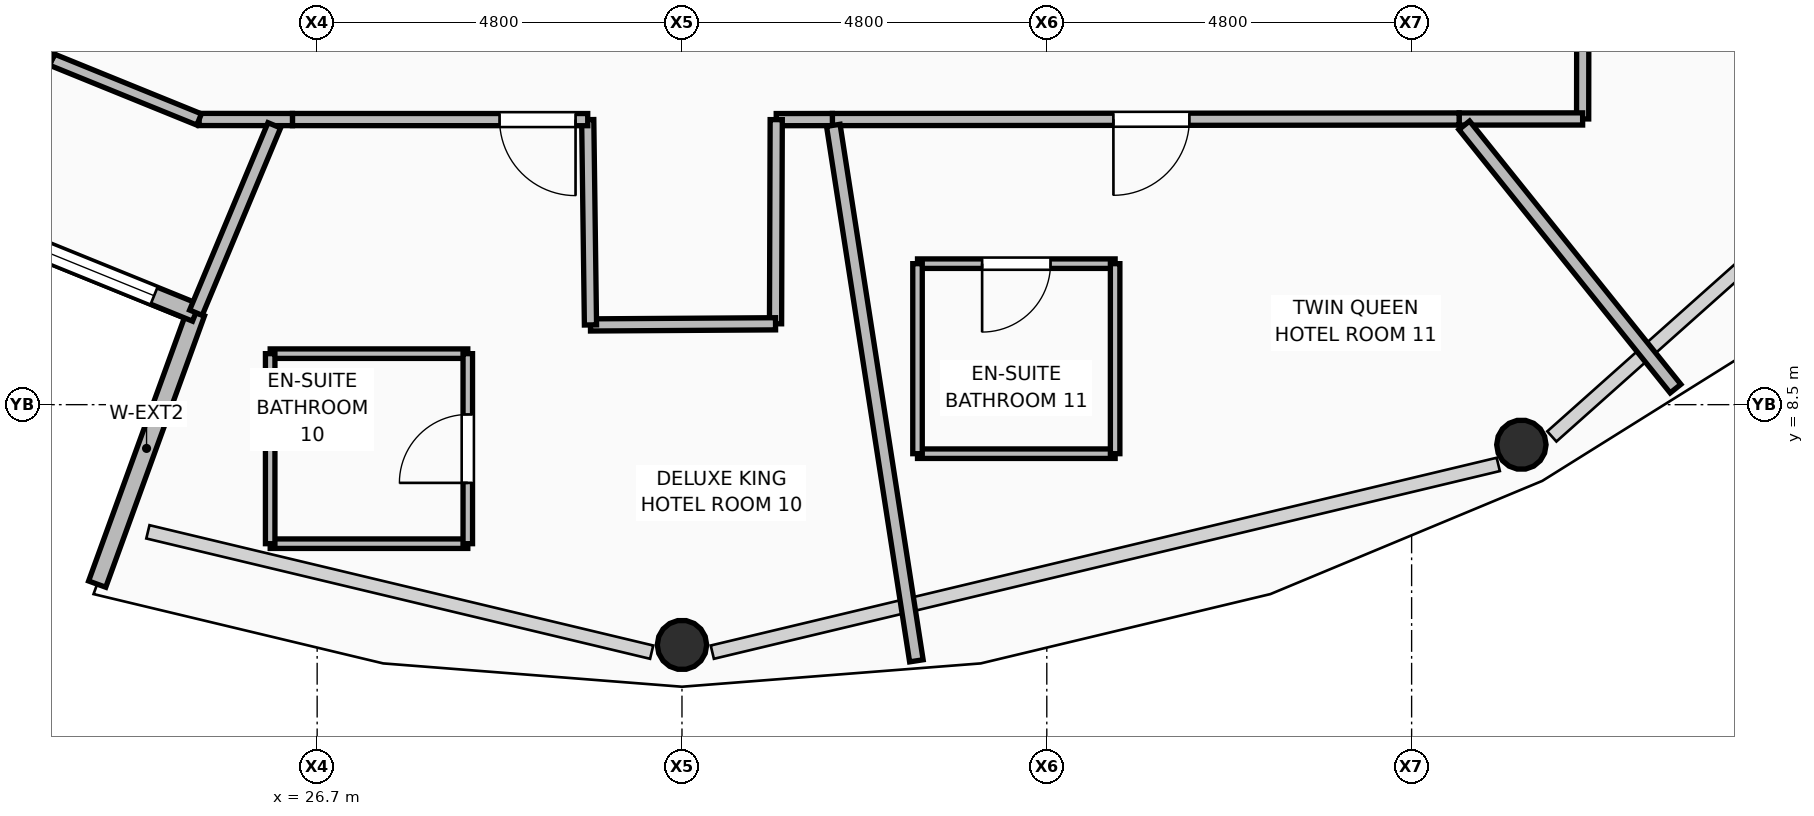
"""IFC4 building model, lengths in metres.
Left out: names, types, materials, properties, quantities, classifications, styles, units other than length and angle.
Written with IfcOpenShell. Run it as: python <this file> out.ifc"""

import sys

from ifc_helpers import new_model, si_unit, direction, frame, frame_2d, origin, origin_2d, place, context, subcontext, project, spatial, rectangle, hollow_circle, extrude, element, fill, save


model = new_model("IFC4")
c1 = context("Model", 3, precision=1e-05, world=origin(), true_north=direction((0.0, 1.0)))
c2 = subcontext(c1, "Body", "Model", "MODEL_VIEW")
j1 = project(units=[si_unit("LENGTHUNIT", "METRE"), si_unit("PLANEANGLEUNIT", "RADIAN")], contexts=[c1])
p1 = place(None, origin())
s1 = spatial("IfcSite", under=j1, at=p1, CompositionType="ELEMENT")
p2 = place(p1, origin())
s2 = spatial("IfcBuilding", under=s1, at=p2, CompositionType="ELEMENT")
p3 = place(p2, frame((0.0, 0.0, 216.15)))
s3 = spatial("IfcBuildingStorey", under=s2, at=p3, CompositionType="ELEMENT", Elevation=216.15)
p4 = place(p3, frame((31.5, 5.339, 0.0), z_axis=(0.0, 0.01818751295, 0.999834593507), x_axis=(-1.0, 0.0, 0.0)))
e1 = element("IfcColumn", 1, at=p4, inside=s3, PredefinedType="COLUMN", context=c2, shape_type="SweptSolid", body=[
    extrude(hollow_circle(Radius=0.325, WallThickness=0.03, at=origin_2d()), origin(), (0.0, 0.0, 1.0), 3.571),
])
p5 = place(p3, frame((42.544, 7.973, 0.0), z_axis=(-0.010597834049, 0.015725818266, 0.999820176108), x_axis=(-0.829266427591, -0.558853462072, 0.0)))
e2 = element("IfcColumn", 2, at=p5, inside=s3, PredefinedType="COLUMN", context=c2, shape_type="SweptSolid", body=[
    extrude(hollow_circle(Radius=0.325, WallThickness=0.03, at=origin_2d()), origin(), (0.0, 0.0, 1.0), 3.571),
])
p6 = place(p3, frame((25.105, 9.71, 0.0), z_axis=(0.0, 0.0, 1.0), x_axis=(-0.34186170747, -0.939750271596, 0.0)))
e3 = element("IfcWall", 3, at=p6, inside=s3, PredefinedType="SOLIDWALL", context=c2, shape_type="SweptSolid", body=[
    extrude(rectangle(XDim=3.8, YDim=0.24, at=frame_2d((1.9, 0.0))), origin(), (0.0, 0.0, 1.0), 3.57),
])
p7 = place(p3, frame((22.151, 10.909, 0.0), z_axis=(0.0, 0.0, 1.0), x_axis=(0.926590027223, -0.376073026752, 0.0)))
e4 = element("IfcWall", 4, at=p7, inside=s3, PredefinedType="SOLIDWALL", context=c2, shape_type="SweptSolid", body=[
    extrude(rectangle(XDim=3.188, YDim=0.24, at=frame_2d((1.594, 0.0))), origin(), (0.0, 0.0, 1.0), 3.57),
])
p8 = place(p7, frame((0.594, 0.0, 0.85)))
e5 = element("IfcOpeningElement", 5, at=p8, cuts=e4, PredefinedType="OPENING", context=c2, shape_type="SweptSolid", body=[
    extrude(rectangle(XDim=2.0, YDim=2.4, at=frame_2d((1.0, 1.2))), frame((0.0, 0.13, 0.0), z_axis=(0.0, -1.0, 0.0), x_axis=(1.0, 0.0, 0.0)), (0.0, 0.0, 1.0), 0.26),
])
p9 = place(p3, frame((43.36, 19.529, 0.0), z_axis=(0.0, 0.0, 1.0), x_axis=(-0.001376854092, -0.999999052136, 0.0)))
e6 = element("IfcWall", 6, at=p9, inside=s3, PredefinedType="PARTITIONING", context=c2, shape_type="SweptSolid", body=[
    extrude(rectangle(XDim=7.27, YDim=0.16, at=frame_2d((3.635, 0.0))), origin(), (0.0, 0.0, 1.0), 3.081),
])
p10 = place(p9, frame((0.602, 0.0, 0.0)))
e7 = element("IfcOpeningElement", 7, at=p10, cuts=e6, PredefinedType="OPENING", context=c2, shape_type="SweptSolid", body=[
    extrude(rectangle(XDim=1.2, YDim=2.1, at=frame_2d((0.6, 1.05))), frame((0.0, 0.09, 0.0), z_axis=(0.0, -1.0, 0.0), x_axis=(1.0, 0.0, 0.0)), (0.0, 0.0, 1.0), 0.18),
])
p11 = place(p3, frame((43.35, 12.259, 0.0), z_axis=(0.0, 0.0, 1.0), x_axis=(-0.999999819423, -0.00060096143, 0.0)))
e8 = element("IfcWall", 8, at=p11, inside=s3, PredefinedType="PARTITIONING", context=c2, shape_type="SweptSolid", body=[
    extrude(rectangle(XDim=1.625, YDim=0.16, at=frame_2d((0.812, 0.0))), origin(), (0.0, 0.0, 1.0), 3.081),
])
p12 = place(p3, frame((41.725, 12.258, 0.0), z_axis=(0.0, 0.0, 1.0), x_axis=(-0.999999631405, -0.000858597504, 0.0)))
e9 = element("IfcWall", 9, at=p12, inside=s3, PredefinedType="PARTITIONING", context=c2, shape_type="SweptSolid", body=[
    extrude(rectangle(XDim=8.246, YDim=0.16, at=frame_2d((4.123, 0.0))), origin(), (0.0, 0.0, 1.0), 3.081),
])
p13 = place(p12, frame((3.549, 0.0, 0.0)))
e10 = element("IfcOpeningElement", 10, at=p13, cuts=e9, PredefinedType="OPENING", context=c2, shape_type="SweptSolid", body=[
    extrude(rectangle(XDim=1.0, YDim=2.1, at=frame_2d((0.5, 1.05))), frame((0.0, 0.09, 0.0), z_axis=(0.0, -1.0, 0.0), x_axis=(1.0, 0.0, 0.0)), (0.0, 0.0, 1.0), 0.18),
])
p14 = place(p3, frame((33.479, 12.251, 0.0), z_axis=(0.0, 0.0, 1.0), x_axis=(-0.999999126899, -0.001321439216, 0.0)))
e11 = element("IfcWall", 11, at=p14, inside=s3, PredefinedType="PARTITIONING", context=c2, shape_type="SweptSolid", body=[
    extrude(rectangle(XDim=0.739, YDim=0.16, at=frame_2d((0.37, 0.0))), origin(), (0.0, 0.0, 1.0), 3.55),
])
p15 = place(p3, frame((32.74, 12.25, 0.0), z_axis=(0.0, 0.0, 1.0), x_axis=(-0.003363005887, -0.99999434508, 0.0)))
e12 = element("IfcWall", 12, at=p15, inside=s3, PredefinedType="PARTITIONING", context=c2, shape_type="SweptSolid", body=[
    extrude(rectangle(XDim=2.686, YDim=0.16, at=frame_2d((1.343, 0.0))), origin(), (0.0, 0.0, 1.0), 3.55),
])
p16 = place(p3, frame((32.731, 9.564, 0.0), z_axis=(0.0, 0.0, 1.0), x_axis=(-0.9999812984, -0.006115786966, 0.0)))
e13 = element("IfcWall", 13, at=p16, inside=s3, PredefinedType="PARTITIONING", context=c2, shape_type="SweptSolid", body=[
    extrude(rectangle(XDim=2.435, YDim=0.16, at=frame_2d((1.218, 0.0))), origin(), (0.0, 0.0, 1.0), 3.081),
])
p17 = place(p3, frame((30.296, 9.549, 0.0), z_axis=(0.0, 0.0, 1.0), x_axis=(-0.013286362168, 0.999911732395, 0.0)))
e14 = element("IfcWall", 14, at=p17, inside=s3, PredefinedType="PARTITIONING", context=c2, shape_type="SweptSolid", body=[
    extrude(rectangle(XDim=2.701, YDim=0.16, at=frame_2d((1.351, 0.0))), origin(), (0.0, 0.0, 1.0), 3.55),
])
p18 = place(p3, frame((30.26, 12.25, 0.0), z_axis=(0.0, 0.0, 1.0), x_axis=(-0.999999968407, 0.000251366799, 0.0)))
e15 = element("IfcWall", 15, at=p18, inside=s3, PredefinedType="PARTITIONING", context=c2, shape_type="SweptSolid", body=[
    extrude(rectangle(XDim=3.885, YDim=0.16, at=frame_2d((1.942, 0.0))), origin(), (0.0, 0.0, 1.0), 3.55),
])
p19 = place(p18, frame((0.16, 0.0, 0.0)))
e16 = element("IfcOpeningElement", 16, at=p19, cuts=e15, PredefinedType="OPENING", context=c2, shape_type="SweptSolid", body=[
    extrude(rectangle(XDim=1.0, YDim=2.1, at=frame_2d((0.5, 1.05))), frame((0.0, 0.09, 0.0), z_axis=(0.0, -1.0, 0.0), x_axis=(1.0, 0.0, 0.0)), (0.0, 0.0, 1.0), 0.18),
])
p20 = place(p3, frame((26.375, 12.251, 0.0), z_axis=(0.0, 0.0, 1.0), x_axis=(-0.999999683806, 0.000795228377, 0.0)))
e17 = element("IfcWall", 17, at=p20, inside=s3, PredefinedType="PARTITIONING", context=c2, shape_type="SweptSolid", body=[
    extrude(rectangle(XDim=1.228, YDim=0.16, at=frame_2d((0.614, 0.0))), origin(), (0.0, 0.0, 1.0), 3.55),
])
p21 = place(p3, frame((25.147, 12.252, 0.0), z_axis=(0.0, 0.0, 1.0), x_axis=(-0.926367254425, 0.376621441143, 0.0)))
e18 = element("IfcWall", 18, at=p21, inside=s3, PredefinedType="PARTITIONING", context=c2, shape_type="SweptSolid", body=[
    extrude(rectangle(XDim=2.09, YDim=0.16, at=frame_2d((1.045, 0.0))), origin(), (0.0, 0.0, 1.0), 3.55),
])
p22 = place(p3, frame((23.211, 13.039, 0.0), z_axis=(0.0, 0.0, 1.0), x_axis=(-0.853752527211, 0.520679001191, 0.0)))
e19 = element("IfcWall", 19, at=p22, inside=s3, PredefinedType="PARTITIONING", context=c2, shape_type="SweptSolid", body=[
    extrude(rectangle(XDim=2.729, YDim=0.16, at=frame_2d((1.365, 0.0))), origin(), (0.0, 0.0, 1.0), 3.081),
])
p23 = place(p3, frame((26.136, 12.175, 0.0), z_axis=(0.0, 0.0, 1.0), x_axis=(-0.385854205699, -0.922559771475, 0.0)))
e20 = element("IfcWall", 20, at=p23, inside=s3, PredefinedType="PARTITIONING", context=c2, shape_type="SweptSolid", body=[
    extrude(rectangle(XDim=2.672, YDim=0.18, at=frame_2d((1.336, 0.0))), origin(), (0.0, 0.0, 1.0), 3.55),
])
p24 = place(p3, frame((33.491, 12.175, 0.0), z_axis=(0.0, 0.0, 1.0), x_axis=(0.153310232807, -0.988178107689, 0.0)))
e21 = element("IfcWall", 21, at=p24, inside=s3, PredefinedType="PARTITIONING", context=c2, shape_type="SweptSolid", body=[
    extrude(rectangle(XDim=7.129, YDim=0.18, at=frame_2d((3.565, 0.0))), origin(), (0.0, 0.0, 1.0), 2.925),
])
p25 = place(p3, frame((41.792, 12.175, 0.0), z_axis=(0.0, 0.0, 1.0), x_axis=(0.625894170608, -0.779907999189, 0.0)))
e22 = element("IfcWall", 22, at=p25, inside=s3, PredefinedType="PARTITIONING", context=c2, shape_type="SweptSolid", body=[
    extrude(rectangle(XDim=4.442, YDim=0.18, at=frame_2d((2.221, 0.0))), origin(), (0.0, 0.0, 1.0), 2.925),
])
p26 = place(p3, frame((26.082, 6.671, 0.0), z_axis=(0.0, 0.0, 1.0), x_axis=(1.0, 0.0, 0.0)))
e23 = element("IfcWall", 23, at=p26, inside=s3, PredefinedType="PARTITIONING", context=c2, shape_type="SweptSolid", body=[
    extrude(rectangle(XDim=2.6, YDim=0.125, at=frame_2d((1.3, 0.0))), origin(), (0.0, 0.0, 1.0), 2.925),
])
p27 = place(p3, frame((26.082, 9.171, 0.0), z_axis=(0.0, 0.0, 1.0), x_axis=(1.0, 0.0, 0.0)))
e24 = element("IfcWall", 24, at=p27, inside=s3, PredefinedType="PARTITIONING", context=c2, shape_type="SweptSolid", body=[
    extrude(rectangle(XDim=2.6, YDim=0.125, at=frame_2d((1.3, 0.0))), origin(), (0.0, 0.0, 1.0), 3.55),
])
p28 = place(p3, frame((26.082, 6.671, 0.0), z_axis=(0.0, 0.0, 1.0), x_axis=(0.0, 1.0, 0.0)))
e25 = element("IfcWall", 25, at=p28, inside=s3, PredefinedType="PARTITIONING", context=c2, shape_type="SweptSolid", body=[
    extrude(rectangle(XDim=2.5, YDim=0.125, at=frame_2d((1.25, 0.0))), origin(), (0.0, 0.0, 1.0), 2.925),
])
p29 = place(p3, frame((28.682, 6.671, 0.0), z_axis=(0.0, 0.0, 1.0), x_axis=(0.0, 1.0, 0.0)))
e26 = element("IfcWall", 26, at=p29, inside=s3, PredefinedType="PARTITIONING", context=c2, shape_type="SweptSolid", body=[
    extrude(rectangle(XDim=2.5, YDim=0.125, at=frame_2d((1.25, 0.0))), origin(), (0.0, 0.0, 1.0), 3.55),
])
p30 = place(p29, frame((0.8, 0.0, 0.0)))
e27 = element("IfcOpeningElement", 27, at=p30, cuts=e26, PredefinedType="OPENING", context=c2, shape_type="SweptSolid", body=[
    extrude(rectangle(XDim=0.9, YDim=2.1, at=frame_2d((0.45, 1.05))), frame((0.0, 0.073, 0.0), z_axis=(0.0, -1.0, 0.0), x_axis=(1.0, 0.0, 0.0)), (0.0, 0.0, 1.0), 0.145),
])
p31 = place(p3, frame((34.599, 7.855, 0.0), z_axis=(0.0, 0.0, 1.0), x_axis=(1.0, 0.0, 0.0)))
e28 = element("IfcWall", 28, at=p31, inside=s3, PredefinedType="PARTITIONING", context=c2, shape_type="SweptSolid", body=[
    extrude(rectangle(XDim=2.6, YDim=0.125, at=frame_2d((1.3, 0.0))), origin(), (0.0, 0.0, 1.0), 3.55),
])
p32 = place(p3, frame((34.599, 10.355, 0.0), z_axis=(0.0, 0.0, 1.0), x_axis=(1.0, 0.0, 0.0)))
e29 = element("IfcWall", 29, at=p32, inside=s3, PredefinedType="PARTITIONING", context=c2, shape_type="SweptSolid", body=[
    extrude(rectangle(XDim=2.6, YDim=0.125, at=frame_2d((1.3, 0.0))), origin(), (0.0, 0.0, 1.0), 3.55),
])
p33 = place(p32, frame((0.85, 0.0, 0.0)))
e30 = element("IfcOpeningElement", 30, at=p33, cuts=e29, PredefinedType="OPENING", context=c2, shape_type="SweptSolid", body=[
    extrude(rectangle(XDim=0.9, YDim=2.1, at=frame_2d((0.45, 1.05))), frame((0.0, 0.073, 0.0), z_axis=(0.0, -1.0, 0.0), x_axis=(1.0, 0.0, 0.0)), (0.0, 0.0, 1.0), 0.145),
])
for number, where, z_axis, x_axis in (
    (31, (34.599, 7.855, 0.0), (0.0, 0.0, 1.0), (0.0, 1.0, 0.0)),
    (32, (37.199, 7.855, 0.0), (0.0, 0.0, 1.0), (0.0, 1.0, 0.0)),
):
    element("IfcWall", number, at=place(p3, frame(where, z_axis=z_axis, x_axis=x_axis)), inside=s3, PredefinedType="PARTITIONING", context=c2, shape_type="SweptSolid", body=[
        extrude(rectangle(XDim=2.5, YDim=0.125, at=frame_2d((1.25, 0.0))), origin(), (0.0, 0.0, 1.0), 3.55),
    ])
p34 = place(p8, origin())
e33 = element("IfcWindow", 33, at=p34, inside=s3, PartitioningType="SINGLE_PANEL", PredefinedType="WINDOW", context=c2, shape_type="SweptSolid", body=[
    extrude(rectangle(XDim=2.0, YDim=2.4, at=frame_2d((1.0, 1.2))), frame((0.0, 0.03, 0.0), z_axis=(0.0, -1.0, 0.0), x_axis=(1.0, 0.0, 0.0)), (0.0, 0.0, 1.0), 0.06),
])
fill(e5, e33)
p35 = place(p30, origin())
e34 = element("IfcDoor", 34, at=p35, inside=s3, OperationType="SINGLE_SWING_LEFT", PredefinedType="DOOR", context=c2, shape_type="SweptSolid", body=[
    extrude(rectangle(XDim=0.9, YDim=2.1, at=frame_2d((0.45, 1.05))), frame((0.0, 0.025, 0.0), z_axis=(0.0, -1.0, 0.0), x_axis=(1.0, 0.0, 0.0)), (0.0, 0.0, 1.0), 0.05),
])
fill(e27, e34)
p36 = place(p19, origin())
e35 = element("IfcDoor", 35, at=p36, inside=s3, OperationType="SINGLE_SWING_LEFT", PredefinedType="DOOR", context=c2, shape_type="SweptSolid", body=[
    extrude(rectangle(XDim=1.0, YDim=2.1, at=frame_2d((0.5, 1.05))), frame((0.0, 0.025, 0.0), z_axis=(0.0, -1.0, 0.0), x_axis=(1.0, 0.0, 0.0)), (0.0, 0.0, 1.0), 0.05),
])
fill(e16, e35)
p37 = place(p33, frame((0.9, 0.0, 0.0), z_axis=(0.0, 0.0, 1.0), x_axis=(-1.0, 0.0, 0.0)))
e36 = element("IfcDoor", 36, at=p37, inside=s3, OperationType="SINGLE_SWING_RIGHT", PredefinedType="DOOR", context=c2, shape_type="SweptSolid", body=[
    extrude(rectangle(XDim=0.9, YDim=2.1, at=frame_2d((0.45, 1.05))), frame((0.0, 0.025, 0.0), z_axis=(0.0, -1.0, 0.0), x_axis=(1.0, 0.0, 0.0)), (0.0, 0.0, 1.0), 0.05),
])
fill(e30, e36)
p38 = place(p13, origin())
e37 = element("IfcDoor", 37, at=p38, inside=s3, OperationType="SINGLE_SWING_RIGHT", PredefinedType="DOOR", context=c2, shape_type="SweptSolid", body=[
    extrude(rectangle(XDim=1.0, YDim=2.1, at=frame_2d((0.5, 1.05))), frame((0.0, 0.025, 0.0), z_axis=(0.0, -1.0, 0.0), x_axis=(1.0, 0.0, 0.0)), (0.0, 0.0, 1.0), 0.05),
])
fill(e10, e37)
save(model, sys.argv[1])
